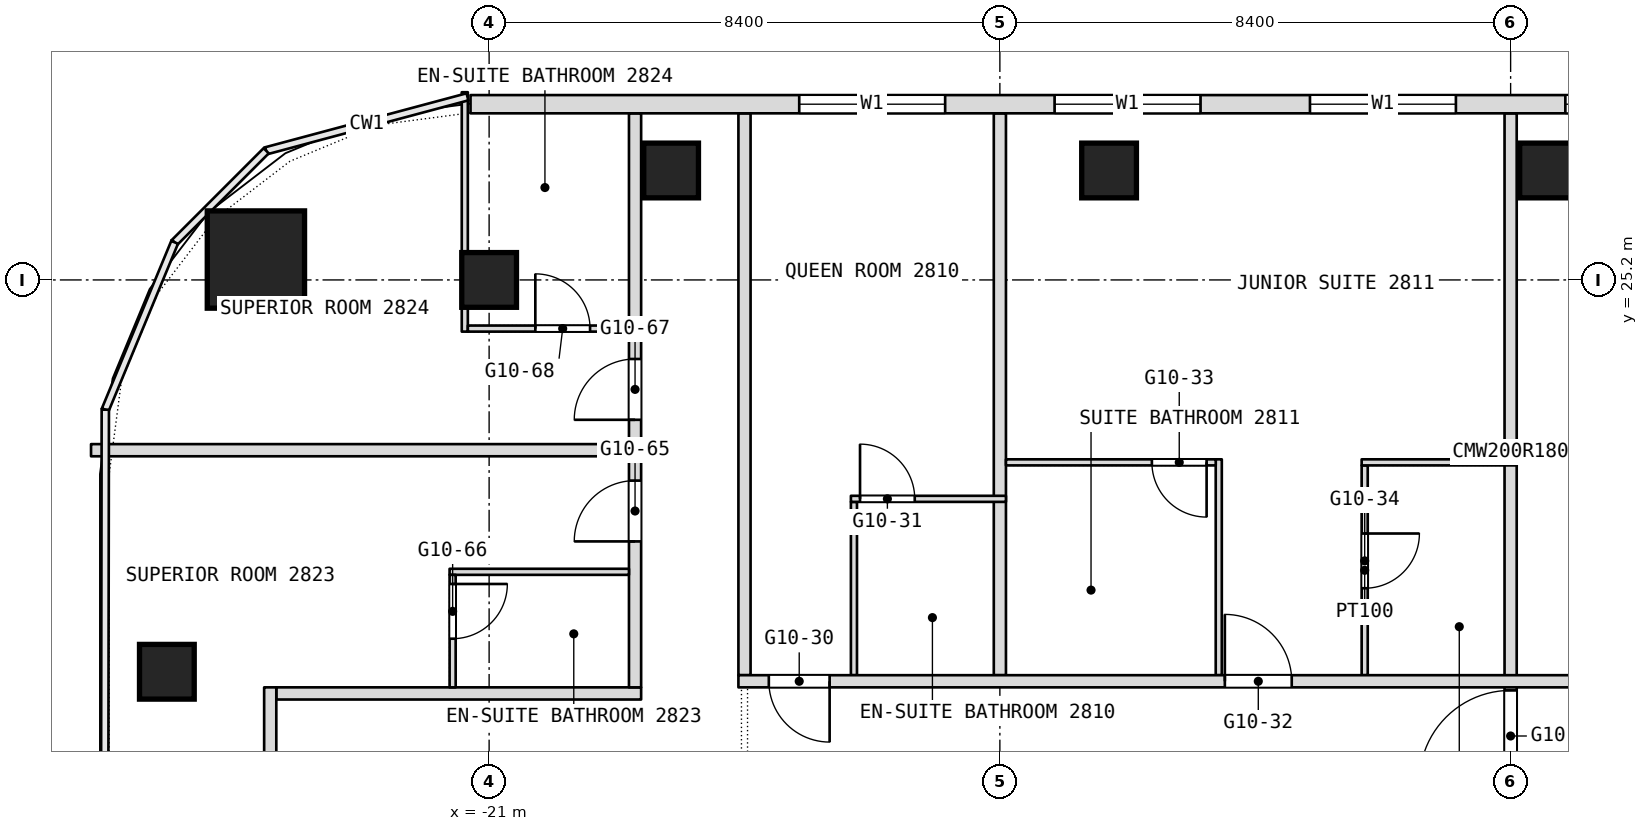
"""IFC4 building model, lengths in metres.
Left out: names, types, materials, properties, quantities, classifications, styles, units other than length and angle.
Written with IfcOpenShell. Run it as: python <this file> out.ifc"""

import sys

from ifc_helpers import new_model, si_unit, direction, frame, frame_2d, origin, origin_2d, place, context, subcontext, project, spatial, rectangle, extrude, element, fill, save


model = new_model("IFC4")
c1 = context("Model", 3, precision=1e-05, world=origin(), true_north=direction((0.0, 1.0)))
c2 = subcontext(c1, "Body", "Model", "MODEL_VIEW")
j1 = project(units=[si_unit("LENGTHUNIT", "METRE"), si_unit("PLANEANGLEUNIT", "RADIAN")], contexts=[c1])
p1 = place(None, origin())
s1 = spatial("IfcSite", under=j1, at=p1, CompositionType="ELEMENT")
p2 = place(p1, origin())
s2 = spatial("IfcBuilding", under=s1, at=p2, CompositionType="ELEMENT")
p3 = place(p2, frame((0.0, 0.0, 126.5)))
s3 = spatial("IfcBuildingStorey", under=s2, at=p3, CompositionType="ELEMENT", Elevation=126.5)
p4 = place(p3, frame((-24.835, 25.535, 0.0), z_axis=(0.0, 0.0, 1.0), x_axis=(1.0, 0.0, 0.0)))
e1 = element("IfcColumn", 1, at=p4, inside=s3, PredefinedType="COLUMN", context=c2, shape_type="SweptSolid", body=[
    extrude(rectangle(XDim=1.6, YDim=1.6, at=origin_2d()), origin(), (0.0, 0.0, 1.0), 3.6),
])
for number, where, z_axis, x_axis in (
    (2, (-21.0, 25.2, 0.0), (0.0, 0.0, 1.0), (1.0, 0.0, 0.0)),
    (3, (-26.3, 18.756, 0.0), (0.0, 0.0, 1.0), (1.0, 0.0, 0.0)),
    (4, (-18.007, 27.0, 0.0), (0.0, 0.0, 1.0), (1.0, 0.0, 0.0)),
    (5, (-10.804, 27.0, 0.0), (0.0, 0.0, 1.0), (1.0, 0.0, 0.0)),
    (6, (-3.601, 27.0, 0.0), (0.0, 0.0, 1.0), (1.0, 0.0, 0.0)),
):
    element("IfcColumn", number, at=place(p3, frame(where, z_axis=z_axis, x_axis=x_axis)), inside=s3, PredefinedType="COLUMN", context=c2, shape_type="SweptSolid", body=[
        extrude(rectangle(XDim=0.9, YDim=0.9, at=origin_2d()), origin(), (0.0, 0.0, 1.0), 3.6),
    ])
p5 = place(p3, frame((-4.2, 16.8, 0.0), z_axis=(0.0, 0.0, 1.0), x_axis=(0.0, 1.0, 0.0)))
e7 = element("IfcWall", 7, at=p5, inside=s3, PredefinedType="PARTITIONING", context=c2, shape_type="SweptSolid", body=[
    extrude(rectangle(XDim=11.14, YDim=0.2, at=frame_2d((5.57, 0.0))), origin(), (0.0, 0.0, 1.0), 3.34),
])
p6 = place(p5, frame((0.15, 0.0, 0.0)))
e8 = element("IfcOpeningElement", 8, at=p6, cuts=e7, PredefinedType="OPENING", context=c2, shape_type="SweptSolid", body=[
    extrude(rectangle(XDim=1.5, YDim=2.1, at=frame_2d((0.75, 1.05))), frame((0.0, 0.1, 0.0), z_axis=(0.0, -1.0, 0.0), x_axis=(1.0, 0.0, 0.0)), (0.0, 0.0, 1.0), 0.2),
])
p7 = place(p3, frame((-6.6, 18.7, 0.0), z_axis=(0.0, 0.0, 1.0), x_axis=(0.0, 1.0, 0.0)))
e9 = element("IfcWall", 9, at=p7, inside=s3, PredefinedType="PARTITIONING", context=c2, shape_type="SweptSolid", body=[
    extrude(rectangle(XDim=3.45, YDim=0.1, at=frame_2d((1.725, 0.0))), origin(), (0.0, 0.0, 1.0), 3.34),
])
p8 = place(p7, frame((1.43, 0.0, 0.0)))
e10 = element("IfcOpeningElement", 10, at=p8, cuts=e9, PredefinedType="OPENING", context=c2, shape_type="SweptSolid", body=[
    extrude(rectangle(XDim=0.9, YDim=2.1, at=frame_2d((0.45, 1.05))), frame((0.0, 0.05, 0.0), z_axis=(0.0, -1.0, 0.0), x_axis=(1.0, 0.0, 0.0)), (0.0, 0.0, 1.0), 0.1),
])
p9 = place(p3, frame((-9.0, 18.7, 0.0), z_axis=(0.0, 0.0, 1.0), x_axis=(0.0, 1.0, 0.0)))
e11 = element("IfcWall", 11, at=p9, inside=s3, PredefinedType="PARTITIONING", context=c2, shape_type="SweptSolid", body=[
    extrude(rectangle(XDim=3.55, YDim=0.1, at=frame_2d((1.775, 0.0))), origin(), (0.0, 0.0, 1.0), 3.34),
])
p10 = place(p3, frame((-12.6, 18.7, 0.0), z_axis=(0.0, 0.0, 1.0), x_axis=(0.0, 1.0, 0.0)))
e12 = element("IfcWall", 12, at=p10, inside=s3, PredefinedType="PARTITIONING", context=c2, shape_type="SweptSolid", body=[
    extrude(rectangle(XDim=9.24, YDim=0.2, at=frame_2d((4.62, 0.0))), origin(), (0.0, 0.0, 1.0), 3.34),
])
p11 = place(p3, frame((-15.0, 18.7, 0.0), z_axis=(0.0, 0.0, 1.0), x_axis=(0.0, 1.0, 0.0)))
e13 = element("IfcWall", 13, at=p11, inside=s3, PredefinedType="PARTITIONING", context=c2, shape_type="SweptSolid", body=[
    extrude(rectangle(XDim=2.85, YDim=0.1, at=frame_2d((1.425, 0.0))), origin(), (0.0, 0.0, 1.0), 3.34),
])
p12 = place(p3, frame((-16.8, 18.7, 0.0), z_axis=(0.0, 0.0, 1.0), x_axis=(0.0, 1.0, 0.0)))
e14 = element("IfcWall", 14, at=p12, inside=s3, PredefinedType="PARTITIONING", context=c2, shape_type="SweptSolid", body=[
    extrude(rectangle(XDim=9.24, YDim=0.2, at=frame_2d((4.62, 0.0))), origin(), (0.0, 0.0, 1.0), 3.34),
])
p13 = place(p3, frame((-24.5, 18.4, 0.0), z_axis=(0.0, 0.0, 1.0), x_axis=(1.0, 0.0, 0.0)))
e15 = element("IfcWall", 15, at=p13, inside=s3, PredefinedType="PARTITIONING", context=c2, shape_type="SweptSolid", body=[
    extrude(rectangle(XDim=6.0, YDim=0.2, at=frame_2d((3.0, 0.0))), origin(), (0.0, 0.0, 1.0), 3.34),
])
p14 = place(p3, frame((-18.6, 18.5, 0.0), z_axis=(0.0, 0.0, 1.0), x_axis=(0.0, 1.0, 0.0)))
e16 = element("IfcWall", 16, at=p14, inside=s3, PredefinedType="PARTITIONING", context=c2, shape_type="SweptSolid", body=[
    extrude(rectangle(XDim=9.44, YDim=0.2, at=frame_2d((4.72, 0.0))), origin(), (0.0, 0.0, 1.0), 3.34),
])
p15 = place(p14, frame((2.4, 0.0, 0.0)))
e17 = element("IfcOpeningElement", 17, at=p15, cuts=e16, PredefinedType="OPENING", context=c2, shape_type="SweptSolid", body=[
    extrude(rectangle(XDim=1.0, YDim=2.1, at=frame_2d((0.5, 1.05))), frame((0.0, 0.1, 0.0), z_axis=(0.0, -1.0, 0.0), x_axis=(1.0, 0.0, 0.0)), (0.0, 0.0, 1.0), 0.2),
])
p16 = place(p14, frame((4.4, 0.0, 0.0)))
e18 = element("IfcOpeningElement", 18, at=p16, cuts=e16, PredefinedType="OPENING", context=c2, shape_type="SweptSolid", body=[
    extrude(rectangle(XDim=1.0, YDim=2.1, at=frame_2d((0.5, 1.05))), frame((0.0, 0.1, 0.0), z_axis=(0.0, -1.0, 0.0), x_axis=(1.0, 0.0, 0.0)), (0.0, 0.0, 1.0), 0.2),
])
p17 = place(p3, frame((-16.9, 18.6, 0.0), z_axis=(0.0, 0.0, 1.0), x_axis=(1.0, 0.0, 0.0)))
e19 = element("IfcWall", 19, at=p17, inside=s3, PredefinedType="PARTITIONING", context=c2, shape_type="SweptSolid", body=[
    extrude(rectangle(XDim=18.4, YDim=0.2, at=frame_2d((9.2, 0.0))), origin(), (0.0, 0.0, 1.0), 3.34),
])
p18 = place(p17, frame((0.5, 0.0, 0.0)))
e20 = element("IfcOpeningElement", 20, at=p18, cuts=e19, PredefinedType="OPENING", context=c2, shape_type="SweptSolid", body=[
    extrude(rectangle(XDim=1.0, YDim=2.1, at=frame_2d((0.5, 1.05))), frame((0.0, 0.1, 0.0), z_axis=(0.0, -1.0, 0.0), x_axis=(1.0, 0.0, 0.0)), (0.0, 0.0, 1.0), 0.2),
])
p19 = place(p17, frame((8.0, 0.0, 0.0)))
e21 = element("IfcOpeningElement", 21, at=p19, cuts=e19, PredefinedType="OPENING", context=c2, shape_type="SweptSolid", body=[
    extrude(rectangle(XDim=1.1, YDim=2.1, at=frame_2d((0.55, 1.05))), frame((0.0, 0.1, 0.0), z_axis=(0.0, -1.0, 0.0), x_axis=(1.0, 0.0, 0.0)), (0.0, 0.0, 1.0), 0.2),
])
p20 = place(p17, frame((16.0, 0.0, 0.0)))
e22 = element("IfcOpeningElement", 22, at=p20, cuts=e19, PredefinedType="OPENING", context=c2, shape_type="SweptSolid", body=[
    extrude(rectangle(XDim=1.8, YDim=2.1, at=frame_2d((0.9, 1.05))), frame((0.0, 0.1, 0.0), z_axis=(0.0, -1.0, 0.0), x_axis=(1.0, 0.0, 0.0)), (0.0, 0.0, 1.0), 0.2),
])
p21 = place(p3, frame((-21.65, 20.4, 0.0), z_axis=(0.0, 0.0, 1.0), x_axis=(1.0, 0.0, 0.0)))
e23 = element("IfcWall", 23, at=p21, inside=s3, PredefinedType="PARTITIONING", context=c2, shape_type="SweptSolid", body=[
    extrude(rectangle(XDim=2.95, YDim=0.1, at=frame_2d((1.475, 0.0))), origin(), (0.0, 0.0, 1.0), 3.34),
])
p22 = place(p3, frame((-21.4, 24.35, 0.0), z_axis=(0.0, 0.0, 1.0), x_axis=(0.0, 1.0, 0.0)))
e24 = element("IfcWall", 24, at=p22, inside=s3, PredefinedType="PARTITIONING", context=c2, shape_type="SweptSolid", body=[
    extrude(rectangle(XDim=3.937, YDim=0.1, at=frame_2d((1.969, 0.0))), origin(), (0.0, 0.0, 1.0), 3.34),
])
p23 = place(p3, frame((-21.6, 18.5, 0.0), z_axis=(0.0, 0.0, 1.0), x_axis=(0.0, 1.0, 0.0)))
e25 = element("IfcWall", 25, at=p23, inside=s3, PredefinedType="PARTITIONING", context=c2, shape_type="SweptSolid", body=[
    extrude(rectangle(XDim=1.85, YDim=0.1, at=frame_2d((0.925, 0.0))), origin(), (0.0, 0.0, 1.0), 3.34),
])
p24 = place(p23, frame((0.8, 0.0, 0.0)))
e26 = element("IfcOpeningElement", 26, at=p24, cuts=e25, PredefinedType="OPENING", context=c2, shape_type="SweptSolid", body=[
    extrude(rectangle(XDim=0.9, YDim=2.1, at=frame_2d((0.45, 1.05))), frame((0.0, 0.05, 0.0), z_axis=(0.0, -1.0, 0.0), x_axis=(1.0, 0.0, 0.0)), (0.0, 0.0, 1.0), 0.1),
])
p25 = place(p3, frame((-15.05, 21.6, 0.0), z_axis=(0.0, 0.0, 1.0), x_axis=(1.0, 0.0, 0.0)))
e27 = element("IfcWall", 27, at=p25, inside=s3, PredefinedType="PARTITIONING", context=c2, shape_type="SweptSolid", body=[
    extrude(rectangle(XDim=2.55, YDim=0.1, at=frame_2d((1.275, 0.0))), origin(), (0.0, 0.0, 1.0), 3.34),
])
p26 = place(p25, frame((0.15, 0.0, 0.0)))
e28 = element("IfcOpeningElement", 28, at=p26, cuts=e27, PredefinedType="OPENING", context=c2, shape_type="SweptSolid", body=[
    extrude(rectangle(XDim=0.9, YDim=2.1, at=frame_2d((0.45, 1.05))), frame((0.0, 0.05, 0.0), z_axis=(0.0, -1.0, 0.0), x_axis=(1.0, 0.0, 0.0)), (0.0, 0.0, 1.0), 0.1),
])
p27 = place(p3, frame((-12.5, 22.2, 0.0), z_axis=(0.0, 0.0, 1.0), x_axis=(1.0, 0.0, 0.0)))
e29 = element("IfcWall", 29, at=p27, inside=s3, PredefinedType="PARTITIONING", context=c2, shape_type="SweptSolid", body=[
    extrude(rectangle(XDim=3.45, YDim=0.1, at=frame_2d((1.725, 0.0))), origin(), (0.0, 0.0, 1.0), 3.34),
])
p28 = place(p27, frame((2.4, 0.0, 0.0)))
e30 = element("IfcOpeningElement", 30, at=p28, cuts=e29, PredefinedType="OPENING", context=c2, shape_type="SweptSolid", body=[
    extrude(rectangle(XDim=0.9, YDim=2.1, at=frame_2d((0.45, 1.05))), frame((0.0, 0.05, 0.0), z_axis=(0.0, -1.0, 0.0), x_axis=(1.0, 0.0, 0.0)), (0.0, 0.0, 1.0), 0.1),
])
p29 = place(p3, frame((-6.65, 22.2, 0.0), z_axis=(0.0, 0.0, 1.0), x_axis=(1.0, 0.0, 0.0)))
e31 = element("IfcWall", 31, at=p29, inside=s3, PredefinedType="PARTITIONING", context=c2, shape_type="SweptSolid", body=[
    extrude(rectangle(XDim=2.55, YDim=0.1, at=frame_2d((1.275, 0.0))), origin(), (0.0, 0.0, 1.0), 3.34),
])
p30 = place(p3, frame((-27.547, 22.4, 0.0), z_axis=(0.0, 0.0, 1.0), x_axis=(1.0, 0.0, 0.0)))
e32 = element("IfcWall", 32, at=p30, inside=s3, PredefinedType="PARTITIONING", context=c2, shape_type="SweptSolid", body=[
    extrude(rectangle(XDim=8.847, YDim=0.2, at=frame_2d((4.424, 0.0))), origin(), (0.0, 0.0, 1.0), 3.34),
])
p31 = place(p3, frame((-21.35, 24.4, 0.0), z_axis=(0.0, 0.0, 1.0), x_axis=(1.0, 0.0, 0.0)))
e33 = element("IfcWall", 33, at=p31, inside=s3, PredefinedType="PARTITIONING", context=c2, shape_type="SweptSolid", body=[
    extrude(rectangle(XDim=2.65, YDim=0.1, at=frame_2d((1.325, 0.0))), origin(), (0.0, 0.0, 1.0), 3.34),
])
p32 = place(p31, frame((1.11, 0.0, 0.0)))
e34 = element("IfcOpeningElement", 34, at=p32, cuts=e33, PredefinedType="OPENING", context=c2, shape_type="SweptSolid", body=[
    extrude(rectangle(XDim=0.9, YDim=2.1, at=frame_2d((0.45, 1.05))), frame((0.0, 0.05, 0.0), z_axis=(0.0, -1.0, 0.0), x_axis=(1.0, 0.0, 0.0)), (0.0, 0.0, 1.0), 0.1),
])
p33 = place(p3, frame((-24.6, 6.9, 0.0), z_axis=(0.0, 0.0, 1.0), x_axis=(0.0, 1.0, 0.0)))
e35 = element("IfcWall", 35, at=p33, inside=s3, PredefinedType="PARTITIONING", context=c2, shape_type="SweptSolid", body=[
    extrude(rectangle(XDim=11.6, YDim=0.2, at=frame_2d((5.8, 0.0))), origin(), (0.0, 0.0, 1.0), 3.34),
])
p34 = place(p33, frame((5.45, 0.0, 0.0)))
e36 = element("IfcOpeningElement", 36, at=p34, cuts=e35, PredefinedType="OPENING", context=c2, shape_type="SweptSolid", body=[
    extrude(rectangle(XDim=1.8, YDim=2.1, at=frame_2d((0.9, 1.05))), frame((0.0, 0.1, 0.0), z_axis=(0.0, -1.0, 0.0), x_axis=(1.0, 0.0, 0.0)), (0.0, 0.0, 1.0), 0.2),
])
p35 = place(p3, frame((21.306, 28.09, 0.0), z_axis=(0.0, 0.0, 1.0), x_axis=(-1.0, 0.0, 0.0)))
e37 = element("IfcWall", 37, at=p35, inside=s3, PredefinedType="NOTDEFINED", context=c2, shape_type="SweptSolid", body=[
    extrude(rectangle(XDim=42.612, YDim=0.3, at=frame_2d((21.306, 0.0))), origin(), (0.0, 0.0, 1.0), 3.6),
])
p36 = place(p35, frame((5.406, 0.0, 0.9)))
e38 = element("IfcOpeningElement", 38, at=p36, cuts=e37, PredefinedType="OPENING", context=c2, shape_type="SweptSolid", body=[
    extrude(rectangle(XDim=2.4, YDim=2.1, at=frame_2d((1.2, 1.05))), frame((0.0, 0.15, 0.0), z_axis=(0.0, -1.0, 0.0), x_axis=(1.0, 0.0, 0.0)), (0.0, 0.0, 1.0), 0.3),
])
p37 = place(p35, frame((9.606, 0.0, 0.9)))
e39 = element("IfcOpeningElement", 39, at=p37, cuts=e37, PredefinedType="OPENING", context=c2, shape_type="SweptSolid", body=[
    extrude(rectangle(XDim=2.4, YDim=2.1, at=frame_2d((1.2, 1.05))), frame((0.0, 0.15, 0.0), z_axis=(0.0, -1.0, 0.0), x_axis=(1.0, 0.0, 0.0)), (0.0, 0.0, 1.0), 0.3),
])
p38 = place(p35, frame((13.806, 0.0, 0.9)))
e40 = element("IfcOpeningElement", 40, at=p38, cuts=e37, PredefinedType="OPENING", context=c2, shape_type="SweptSolid", body=[
    extrude(rectangle(XDim=2.4, YDim=2.1, at=frame_2d((1.2, 1.05))), frame((0.0, 0.15, 0.0), z_axis=(0.0, -1.0, 0.0), x_axis=(1.0, 0.0, 0.0)), (0.0, 0.0, 1.0), 0.3),
])
p39 = place(p35, frame((18.006, 0.0, 0.9)))
e41 = element("IfcOpeningElement", 41, at=p39, cuts=e37, PredefinedType="OPENING", context=c2, shape_type="SweptSolid", body=[
    extrude(rectangle(XDim=2.4, YDim=2.1, at=frame_2d((1.2, 1.05))), frame((0.0, 0.15, 0.0), z_axis=(0.0, -1.0, 0.0), x_axis=(1.0, 0.0, 0.0)), (0.0, 0.0, 1.0), 0.3),
])
p40 = place(p35, frame((22.206, 0.0, 0.9)))
e42 = element("IfcOpeningElement", 42, at=p40, cuts=e37, PredefinedType="OPENING", context=c2, shape_type="SweptSolid", body=[
    extrude(rectangle(XDim=2.4, YDim=2.1, at=frame_2d((1.2, 1.05))), frame((0.0, 0.15, 0.0), z_axis=(0.0, -1.0, 0.0), x_axis=(1.0, 0.0, 0.0)), (0.0, 0.0, 1.0), 0.3),
])
p41 = place(p35, frame((26.406, 0.0, 0.9)))
e43 = element("IfcOpeningElement", 43, at=p41, cuts=e37, PredefinedType="OPENING", context=c2, shape_type="SweptSolid", body=[
    extrude(rectangle(XDim=2.4, YDim=2.1, at=frame_2d((1.2, 1.05))), frame((0.0, 0.15, 0.0), z_axis=(0.0, -1.0, 0.0), x_axis=(1.0, 0.0, 0.0)), (0.0, 0.0, 1.0), 0.3),
])
p42 = place(p35, frame((30.606, 0.0, 0.9)))
e44 = element("IfcOpeningElement", 44, at=p42, cuts=e37, PredefinedType="OPENING", context=c2, shape_type="SweptSolid", body=[
    extrude(rectangle(XDim=2.4, YDim=2.1, at=frame_2d((1.2, 1.05))), frame((0.0, 0.15, 0.0), z_axis=(0.0, -1.0, 0.0), x_axis=(1.0, 0.0, 0.0)), (0.0, 0.0, 1.0), 0.3),
])
p43 = place(p35, frame((34.806, 0.0, 0.9)))
e45 = element("IfcOpeningElement", 45, at=p43, cuts=e37, PredefinedType="OPENING", context=c2, shape_type="SweptSolid", body=[
    extrude(rectangle(XDim=2.4, YDim=2.1, at=frame_2d((1.2, 1.05))), frame((0.0, 0.15, 0.0), z_axis=(0.0, -1.0, 0.0), x_axis=(1.0, 0.0, 0.0)), (0.0, 0.0, 1.0), 0.3),
])
p44 = place(p8, origin())
e46 = element("IfcDoor", 46, at=p44, inside=s3, OperationType="SINGLE_SWING_LEFT", PredefinedType="DOOR", context=c2, shape_type="SweptSolid", body=[
    extrude(rectangle(XDim=0.9, YDim=2.1, at=frame_2d((0.45, 1.05))), frame((0.0, 0.025, 0.0), z_axis=(0.0, -1.0, 0.0), x_axis=(1.0, 0.0, 0.0)), (0.0, 0.0, 1.0), 0.05),
])
fill(e10, e46)
p45 = place(p15, origin())
e47 = element("IfcDoor", 47, at=p45, inside=s3, OperationType="SINGLE_SWING_RIGHT", PredefinedType="DOOR", context=c2, shape_type="SweptSolid", body=[
    extrude(rectangle(XDim=1.0, YDim=2.1, at=frame_2d((0.5, 1.05))), frame((0.0, 0.025, 0.0), z_axis=(0.0, -1.0, 0.0), x_axis=(1.0, 0.0, 0.0)), (0.0, 0.0, 1.0), 0.05),
])
fill(e17, e47)
p46 = place(p16, origin())
e48 = element("IfcDoor", 48, at=p46, inside=s3, OperationType="SINGLE_SWING_RIGHT", PredefinedType="DOOR", context=c2, shape_type="SweptSolid", body=[
    extrude(rectangle(XDim=1.0, YDim=2.1, at=frame_2d((0.5, 1.05))), frame((0.0, 0.025, 0.0), z_axis=(0.0, -1.0, 0.0), x_axis=(1.0, 0.0, 0.0)), (0.0, 0.0, 1.0), 0.05),
])
fill(e18, e48)
p47 = place(p18, origin())
e49 = element("IfcDoor", 49, at=p47, inside=s3, OperationType="SINGLE_SWING_LEFT", PredefinedType="DOOR", context=c2, shape_type="SweptSolid", body=[
    extrude(rectangle(XDim=1.0, YDim=2.1, at=frame_2d((0.5, 1.05))), frame((0.0, 0.025, 0.0), z_axis=(0.0, -1.0, 0.0), x_axis=(1.0, 0.0, 0.0)), (0.0, 0.0, 1.0), 0.05),
])
fill(e20, e49)
p48 = place(p19, origin())
e50 = element("IfcDoor", 50, at=p48, inside=s3, OperationType="SINGLE_SWING_LEFT", PredefinedType="DOOR", context=c2, shape_type="SweptSolid", body=[
    extrude(rectangle(XDim=1.1, YDim=2.1, at=frame_2d((0.55, 1.05))), frame((0.0, 0.025, 0.0), z_axis=(0.0, -1.0, 0.0), x_axis=(1.0, 0.0, 0.0)), (0.0, 0.0, 1.0), 0.05),
])
fill(e21, e50)
p49 = place(p24, origin())
e51 = element("IfcDoor", 51, at=p49, inside=s3, OperationType="SINGLE_SWING_LEFT", PredefinedType="DOOR", context=c2, shape_type="SweptSolid", body=[
    extrude(rectangle(XDim=0.9, YDim=2.1, at=frame_2d((0.45, 1.05))), frame((0.0, 0.025, 0.0), z_axis=(0.0, -1.0, 0.0), x_axis=(1.0, 0.0, 0.0)), (0.0, 0.0, 1.0), 0.05),
])
fill(e26, e51)
p50 = place(p26, origin())
e52 = element("IfcDoor", 52, at=p50, inside=s3, OperationType="SINGLE_SWING_RIGHT", PredefinedType="DOOR", context=c2, shape_type="SweptSolid", body=[
    extrude(rectangle(XDim=0.9, YDim=2.1, at=frame_2d((0.45, 1.05))), frame((0.0, 0.025, 0.0), z_axis=(0.0, -1.0, 0.0), x_axis=(1.0, 0.0, 0.0)), (0.0, 0.0, 1.0), 0.05),
])
fill(e28, e52)
p51 = place(p28, origin())
e53 = element("IfcDoor", 53, at=p51, inside=s3, OperationType="SINGLE_SWING_LEFT", PredefinedType="DOOR", context=c2, shape_type="SweptSolid", body=[
    extrude(rectangle(XDim=0.9, YDim=2.1, at=frame_2d((0.45, 1.05))), frame((0.0, 0.025, 0.0), z_axis=(0.0, -1.0, 0.0), x_axis=(1.0, 0.0, 0.0)), (0.0, 0.0, 1.0), 0.05),
])
fill(e30, e53)
p52 = place(p32, origin())
e54 = element("IfcDoor", 54, at=p52, inside=s3, OperationType="SINGLE_SWING_LEFT", PredefinedType="DOOR", context=c2, shape_type="SweptSolid", body=[
    extrude(rectangle(XDim=0.9, YDim=2.1, at=frame_2d((0.45, 1.05))), frame((0.0, 0.025, 0.0), z_axis=(0.0, -1.0, 0.0), x_axis=(1.0, 0.0, 0.0)), (0.0, 0.0, 1.0), 0.05),
])
fill(e34, e54)
p53 = place(p40, origin())
e55 = element("IfcWindow", 55, at=p53, inside=s3, PartitioningType="SINGLE_PANEL", PredefinedType="WINDOW", context=c2, shape_type="SweptSolid", body=[
    extrude(rectangle(XDim=2.4, YDim=2.1, at=frame_2d((1.2, 1.05))), frame((0.0, 0.03, 0.0), z_axis=(0.0, -1.0, 0.0), x_axis=(1.0, 0.0, 0.0)), (0.0, 0.0, 1.0), 0.06),
])
fill(e42, e55)
p54 = place(p41, origin())
e56 = element("IfcWindow", 56, at=p54, inside=s3, PartitioningType="SINGLE_PANEL", PredefinedType="WINDOW", context=c2, shape_type="SweptSolid", body=[
    extrude(rectangle(XDim=2.4, YDim=2.1, at=frame_2d((1.2, 1.05))), frame((0.0, 0.03, 0.0), z_axis=(0.0, -1.0, 0.0), x_axis=(1.0, 0.0, 0.0)), (0.0, 0.0, 1.0), 0.06),
])
fill(e43, e56)
p55 = place(p42, origin())
e57 = element("IfcWindow", 57, at=p55, inside=s3, PartitioningType="SINGLE_PANEL", PredefinedType="WINDOW", context=c2, shape_type="SweptSolid", body=[
    extrude(rectangle(XDim=2.4, YDim=2.1, at=frame_2d((1.2, 1.05))), frame((0.0, 0.03, 0.0), z_axis=(0.0, -1.0, 0.0), x_axis=(1.0, 0.0, 0.0)), (0.0, 0.0, 1.0), 0.06),
])
fill(e44, e57)
p56 = place(p43, origin())
e58 = element("IfcWindow", 58, at=p56, inside=s3, PartitioningType="SINGLE_PANEL", PredefinedType="WINDOW", context=c2, shape_type="SweptSolid", body=[
    extrude(rectangle(XDim=2.4, YDim=2.1, at=frame_2d((1.2, 1.05))), frame((0.0, 0.03, 0.0), z_axis=(0.0, -1.0, 0.0), x_axis=(1.0, 0.0, 0.0)), (0.0, 0.0, 1.0), 0.06),
])
fill(e45, e58)
p57 = place(p6, origin())
e59 = element("IfcDoor", 59, at=p57, inside=s3, OperationType="DOUBLE_DOOR_DOUBLE_SWING", PredefinedType="DOOR", context=c2, shape_type="SweptSolid", body=[
    extrude(rectangle(XDim=1.5, YDim=2.1, at=frame_2d((0.75, 1.05))), frame((0.0, 0.025, 0.0), z_axis=(0.0, -1.0, 0.0), x_axis=(1.0, 0.0, 0.0)), (0.0, 0.0, 1.0), 0.05),
])
fill(e8, e59)
save(model, sys.argv[1])
